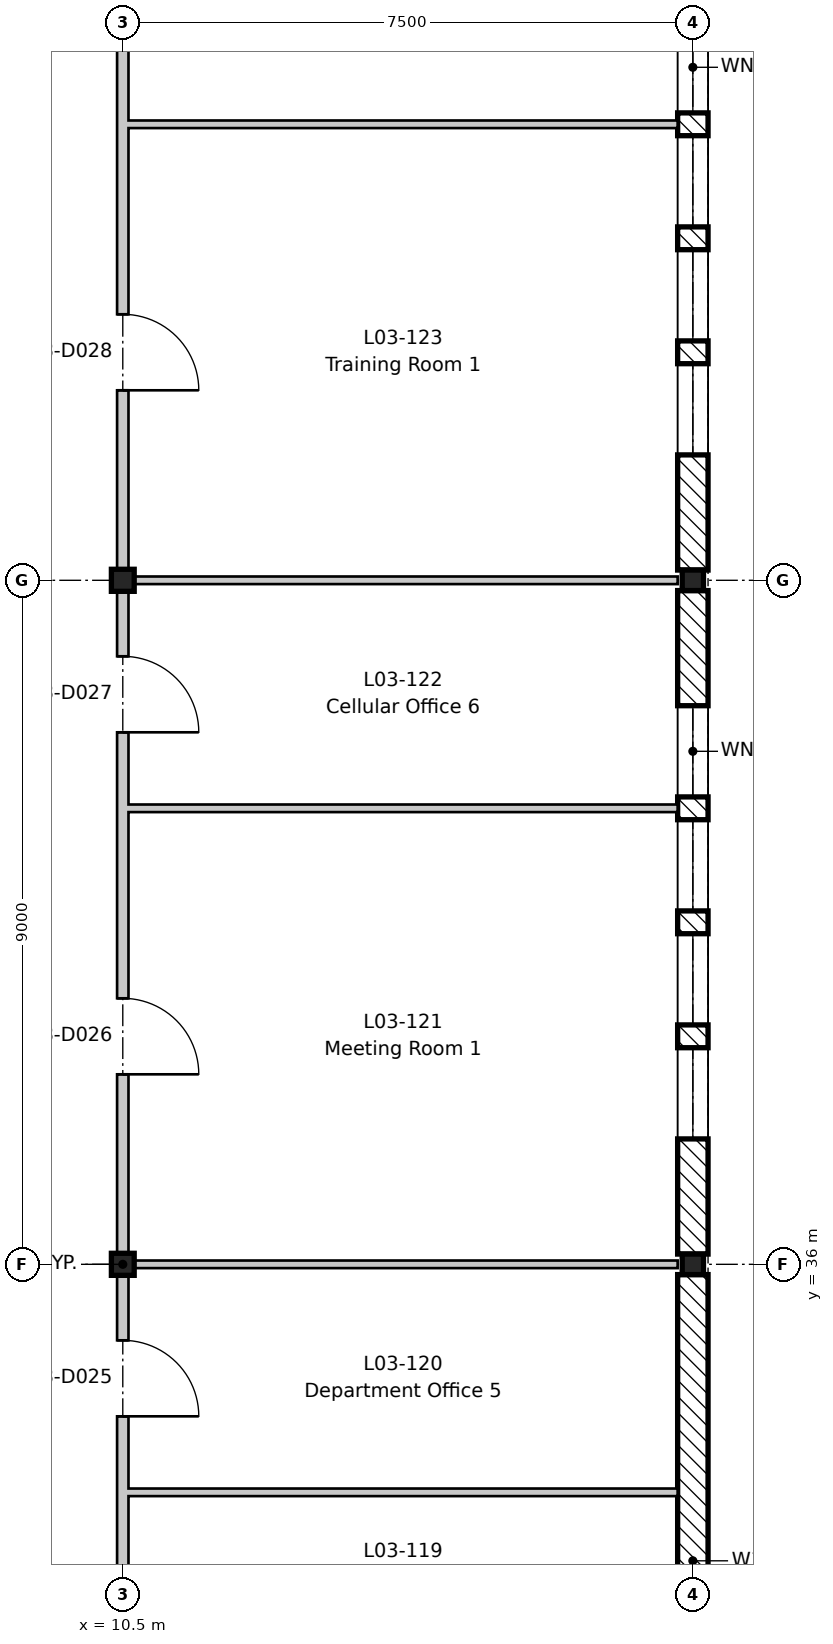
"""IFC4 building model, lengths in metres.
Left out: names, types, materials, properties, quantities, classifications, styles, units other than length and angle.
Written with IfcOpenShell. Run it as: python <this file> out.ifc"""

import sys

from ifc_helpers import new_model, si_unit, direction, frame, frame_2d, origin, origin_2d, place, context, subcontext, project, spatial, rectangle, i_section, extrude, element, fill, save


model = new_model("IFC4")
c1 = context("Model", 3, precision=1e-05, world=origin(), true_north=direction((0.0, 1.0)))
c2 = subcontext(c1, "Body", "Model", "MODEL_VIEW")
j1 = project(units=[si_unit("LENGTHUNIT", "METRE"), si_unit("PLANEANGLEUNIT", "RADIAN")], contexts=[c1])
p1 = place(None, origin())
s1 = spatial("IfcSite", under=j1, at=p1, CompositionType="ELEMENT")
p2 = place(p1, origin())
s2 = spatial("IfcBuilding", under=s1, at=p2, CompositionType="ELEMENT")
p3 = place(p2, frame((0.0, 0.0, 14.4)))
s3 = spatial("IfcBuildingStorey", under=s2, at=p3, CompositionType="ELEMENT", Elevation=14.4)
for number, where, z_axis, x_axis in (
    (1, (10.5, 36.0, -0.2), (0.0, 0.0, 1.0), (1.0, 0.0, 0.0)),
    (2, (10.5, 45.0, -0.2), (0.0, 0.0, 1.0), (1.0, 0.0, 0.0)),
):
    element("IfcColumn", number, at=place(p3, frame(where, z_axis=z_axis, x_axis=x_axis)), inside=s3, PredefinedType="COLUMN", context=c2, shape_type="SweptSolid", body=[
        extrude(i_section(OverallWidth=0.3, OverallDepth=0.29, WebThickness=0.009, FlangeThickness=0.014, FilletRadius=0.027, at=origin_2d()), origin(), (0.0, 0.0, 1.0), 4.2),
    ])
for number, where, z_axis, x_axis in (
    (3, (18.0, 36.0, -0.2), (0.0, 0.0, 1.0), (1.0, 0.0, 0.0)),
    (4, (18.0, 45.0, -0.2), (0.0, 0.0, 1.0), (1.0, 0.0, 0.0)),
):
    element("IfcColumn", number, at=place(p3, frame(where, z_axis=z_axis, x_axis=x_axis)), inside=s3, PredefinedType="COLUMN", context=c2, shape_type="SweptSolid", body=[
        extrude(i_section(OverallWidth=0.28, OverallDepth=0.27, WebThickness=0.008, FlangeThickness=0.013, FilletRadius=0.024, at=origin_2d()), origin(), (0.0, 0.0, 1.0), 4.2),
    ])
p4 = place(p3, frame((18.0, 35.865, 0.0), z_axis=(0.0, 0.0, 1.0), x_axis=(0.0, -1.0, 0.0)))
e5 = element("IfcWall", 5, at=p4, inside=s3, PredefinedType="STANDARD", context=c2, shape_type="SweptSolid", body=[
    extrude(rectangle(XDim=8.73, YDim=0.4, at=frame_2d((4.365, 0.0))), origin(), (0.0, 0.0, 1.0), 3.6),
])
p5 = place(p3, frame((18.0, 44.865, 0.0), z_axis=(0.0, 0.0, 1.0), x_axis=(0.0, -1.0, 0.0)))
e6 = element("IfcWall", 6, at=p5, inside=s3, PredefinedType="STANDARD", context=c2, shape_type="SweptSolid", body=[
    extrude(rectangle(XDim=8.73, YDim=0.4, at=frame_2d((4.365, 0.0))), origin(), (0.0, 0.0, 1.0), 3.6),
])
p6 = place(p5, frame((6.015, 0.0, 0.6)))
e7 = element("IfcOpeningElement", 7, at=p6, cuts=e6, PredefinedType="OPENING", context=c2, shape_type="SweptSolid", body=[
    extrude(rectangle(XDim=1.2, YDim=2.7, at=frame_2d((0.6, 1.35))), frame((0.0, 0.21, 0.0), z_axis=(0.0, -1.0, 0.0), x_axis=(1.0, 0.0, 0.0)), (0.0, 0.0, 1.0), 0.42),
])
p7 = place(p5, frame((4.515, 0.0, 0.6)))
e8 = element("IfcOpeningElement", 8, at=p7, cuts=e6, PredefinedType="OPENING", context=c2, shape_type="SweptSolid", body=[
    extrude(rectangle(XDim=1.2, YDim=2.7, at=frame_2d((0.6, 1.35))), frame((0.0, 0.21, 0.0), z_axis=(0.0, -1.0, 0.0), x_axis=(1.0, 0.0, 0.0)), (0.0, 0.0, 1.0), 0.42),
])
p8 = place(p5, frame((3.015, 0.0, 0.6)))
e9 = element("IfcOpeningElement", 9, at=p8, cuts=e6, PredefinedType="OPENING", context=c2, shape_type="SweptSolid", body=[
    extrude(rectangle(XDim=1.2, YDim=2.7, at=frame_2d((0.6, 1.35))), frame((0.0, 0.21, 0.0), z_axis=(0.0, -1.0, 0.0), x_axis=(1.0, 0.0, 0.0)), (0.0, 0.0, 1.0), 0.42),
])
p9 = place(p5, frame((1.515, 0.0, 0.6)))
e10 = element("IfcOpeningElement", 10, at=p9, cuts=e6, PredefinedType="OPENING", context=c2, shape_type="SweptSolid", body=[
    extrude(rectangle(XDim=1.2, YDim=2.7, at=frame_2d((0.6, 1.35))), frame((0.0, 0.21, 0.0), z_axis=(0.0, -1.0, 0.0), x_axis=(1.0, 0.0, 0.0)), (0.0, 0.0, 1.0), 0.42),
])
p10 = place(p3, frame((18.0, 53.865, 0.0), z_axis=(0.0, 0.0, 1.0), x_axis=(0.0, -1.0, 0.0)))
e11 = element("IfcWall", 11, at=p10, inside=s3, PredefinedType="STANDARD", context=c2, shape_type="SweptSolid", body=[
    extrude(rectangle(XDim=8.73, YDim=0.4, at=frame_2d((4.365, 0.0))), origin(), (0.0, 0.0, 1.0), 3.6),
])
p11 = place(p10, frame((6.015, 0.0, 0.6)))
e12 = element("IfcOpeningElement", 12, at=p11, cuts=e11, PredefinedType="OPENING", context=c2, shape_type="SweptSolid", body=[
    extrude(rectangle(XDim=1.2, YDim=2.7, at=frame_2d((0.6, 1.35))), frame((0.0, 0.21, 0.0), z_axis=(0.0, -1.0, 0.0), x_axis=(1.0, 0.0, 0.0)), (0.0, 0.0, 1.0), 0.42),
])
p12 = place(p10, frame((4.515, 0.0, 0.6)))
e13 = element("IfcOpeningElement", 13, at=p12, cuts=e11, PredefinedType="OPENING", context=c2, shape_type="SweptSolid", body=[
    extrude(rectangle(XDim=1.2, YDim=2.7, at=frame_2d((0.6, 1.35))), frame((0.0, 0.21, 0.0), z_axis=(0.0, -1.0, 0.0), x_axis=(1.0, 0.0, 0.0)), (0.0, 0.0, 1.0), 0.42),
])
p13 = place(p10, frame((3.015, 0.0, 0.6)))
e14 = element("IfcOpeningElement", 14, at=p13, cuts=e11, PredefinedType="OPENING", context=c2, shape_type="SweptSolid", body=[
    extrude(rectangle(XDim=1.2, YDim=2.7, at=frame_2d((0.6, 1.35))), frame((0.0, 0.21, 0.0), z_axis=(0.0, -1.0, 0.0), x_axis=(1.0, 0.0, 0.0)), (0.0, 0.0, 1.0), 0.42),
])
p14 = place(p10, frame((1.515, 0.0, 0.6)))
e15 = element("IfcOpeningElement", 15, at=p14, cuts=e11, PredefinedType="OPENING", context=c2, shape_type="SweptSolid", body=[
    extrude(rectangle(XDim=1.2, YDim=2.7, at=frame_2d((0.6, 1.35))), frame((0.0, 0.21, 0.0), z_axis=(0.0, -1.0, 0.0), x_axis=(1.0, 0.0, 0.0)), (0.0, 0.0, 1.0), 0.42),
])
p15 = place(p3, frame((10.575, 33.0, 0.0), z_axis=(0.0, 0.0, 1.0), x_axis=(1.0, 0.0, 0.0)))
e16 = element("IfcWall", 16, at=p15, inside=s3, PredefinedType="PARTITIONING", context=c2, shape_type="SweptSolid", body=[
    extrude(rectangle(XDim=7.225, YDim=0.1, at=frame_2d((3.613, 0.0))), origin(), (0.0, 0.0, 1.0), 4.0),
])
p16 = place(p3, frame((10.575, 36.0, 0.0), z_axis=(0.0, 0.0, 1.0), x_axis=(1.0, 0.0, 0.0)))
e17 = element("IfcWall", 17, at=p16, inside=s3, PredefinedType="PARTITIONING", context=c2, shape_type="SweptSolid", body=[
    extrude(rectangle(XDim=7.225, YDim=0.1, at=frame_2d((3.613, 0.0))), origin(), (0.0, 0.0, 1.0), 3.65),
])
p17 = place(p3, frame((10.575, 42.0, 0.0), z_axis=(0.0, 0.0, 1.0), x_axis=(1.0, 0.0, 0.0)))
e18 = element("IfcWall", 18, at=p17, inside=s3, PredefinedType="PARTITIONING", context=c2, shape_type="SweptSolid", body=[
    extrude(rectangle(XDim=7.225, YDim=0.1, at=frame_2d((3.613, 0.0))), origin(), (0.0, 0.0, 1.0), 4.0),
])
p18 = place(p3, frame((10.575, 45.0, 0.0), z_axis=(0.0, 0.0, 1.0), x_axis=(1.0, 0.0, 0.0)))
e19 = element("IfcWall", 19, at=p18, inside=s3, PredefinedType="PARTITIONING", context=c2, shape_type="SweptSolid", body=[
    extrude(rectangle(XDim=7.225, YDim=0.1, at=frame_2d((3.613, 0.0))), origin(), (0.0, 0.0, 1.0), 3.65),
])
p19 = place(p3, frame((10.575, 51.0, 0.0), z_axis=(0.0, 0.0, 1.0), x_axis=(1.0, 0.0, 0.0)))
e20 = element("IfcWall", 20, at=p19, inside=s3, PredefinedType="PARTITIONING", context=c2, shape_type="SweptSolid", body=[
    extrude(rectangle(XDim=7.225, YDim=0.1, at=frame_2d((3.613, 0.0))), origin(), (0.0, 0.0, 1.0), 4.0),
])
p20 = place(p3, frame((10.5, -8.8, 0.0), z_axis=(0.0, 0.0, 1.0), x_axis=(0.0, 1.0, 0.0)))
e21 = element("IfcWall", 21, at=p20, inside=s3, PredefinedType="PARTITIONING", context=c2, shape_type="SweptSolid", body=[
    extrude(rectangle(XDim=79.3, YDim=0.15, at=frame_2d((39.65, 0.0))), origin(), (0.0, 0.0, 1.0), 3.48),
])
p21 = place(p20, frame((3.6, 0.0, 0.0)))
e22 = element("IfcOpeningElement", 22, at=p21, cuts=e21, PredefinedType="OPENING", context=c2, shape_type="SweptSolid", body=[
    extrude(rectangle(XDim=1.4, YDim=2.1, at=frame_2d((0.7, 1.05))), frame((0.0, 0.085, 0.0), z_axis=(0.0, -1.0, 0.0), x_axis=(1.0, 0.0, 0.0)), (0.0, 0.0, 1.0), 0.17),
])
p22 = place(p20, frame((9.8, 0.0, 0.0)))
e23 = element("IfcOpeningElement", 23, at=p22, cuts=e21, PredefinedType="OPENING", context=c2, shape_type="SweptSolid", body=[
    extrude(rectangle(XDim=1.0, YDim=2.1, at=frame_2d((0.5, 1.05))), frame((0.0, 0.085, 0.0), z_axis=(0.0, -1.0, 0.0), x_axis=(1.0, 0.0, 0.0)), (0.0, 0.0, 1.0), 0.17),
])
p23 = place(p20, frame((12.8, 0.0, 0.0)))
e24 = element("IfcOpeningElement", 24, at=p23, cuts=e21, PredefinedType="OPENING", context=c2, shape_type="SweptSolid", body=[
    extrude(rectangle(XDim=1.0, YDim=2.1, at=frame_2d((0.5, 1.05))), frame((0.0, 0.085, 0.0), z_axis=(0.0, -1.0, 0.0), x_axis=(1.0, 0.0, 0.0)), (0.0, 0.0, 1.0), 0.17),
])
p24 = place(p20, frame((15.8, 0.0, 0.0)))
e25 = element("IfcOpeningElement", 25, at=p24, cuts=e21, PredefinedType="OPENING", context=c2, shape_type="SweptSolid", body=[
    extrude(rectangle(XDim=1.0, YDim=2.1, at=frame_2d((0.5, 1.05))), frame((0.0, 0.085, 0.0), z_axis=(0.0, -1.0, 0.0), x_axis=(1.0, 0.0, 0.0)), (0.0, 0.0, 1.0), 0.17),
])
p25 = place(p20, frame((18.8, 0.0, 0.0)))
e26 = element("IfcOpeningElement", 26, at=p25, cuts=e21, PredefinedType="OPENING", context=c2, shape_type="SweptSolid", body=[
    extrude(rectangle(XDim=1.0, YDim=2.1, at=frame_2d((0.5, 1.05))), frame((0.0, 0.085, 0.0), z_axis=(0.0, -1.0, 0.0), x_axis=(1.0, 0.0, 0.0)), (0.0, 0.0, 1.0), 0.17),
])
p26 = place(p20, frame((21.8, 0.0, 0.0)))
e27 = element("IfcOpeningElement", 27, at=p26, cuts=e21, PredefinedType="OPENING", context=c2, shape_type="SweptSolid", body=[
    extrude(rectangle(XDim=1.0, YDim=2.1, at=frame_2d((0.5, 1.05))), frame((0.0, 0.085, 0.0), z_axis=(0.0, -1.0, 0.0), x_axis=(1.0, 0.0, 0.0)), (0.0, 0.0, 1.0), 0.17),
])
p27 = place(p20, frame((27.6, 0.0, 0.0)))
e28 = element("IfcOpeningElement", 28, at=p27, cuts=e21, PredefinedType="OPENING", context=c2, shape_type="SweptSolid", body=[
    extrude(rectangle(XDim=1.4, YDim=2.1, at=frame_2d((0.7, 1.05))), frame((0.0, 0.085, 0.0), z_axis=(0.0, -1.0, 0.0), x_axis=(1.0, 0.0, 0.0)), (0.0, 0.0, 1.0), 0.17),
])
p28 = place(p20, frame((36.55, 0.0, 0.0)))
e29 = element("IfcOpeningElement", 29, at=p28, cuts=e21, PredefinedType="OPENING", context=c2, shape_type="SweptSolid", body=[
    extrude(rectangle(XDim=1.0, YDim=2.1, at=frame_2d((0.5, 1.05))), frame((0.0, 0.085, 0.0), z_axis=(0.0, -1.0, 0.0), x_axis=(1.0, 0.0, 0.0)), (0.0, 0.0, 1.0), 0.17),
])
p29 = place(p20, frame((39.8, 0.0, 0.0)))
e30 = element("IfcOpeningElement", 30, at=p29, cuts=e21, PredefinedType="OPENING", context=c2, shape_type="SweptSolid", body=[
    extrude(rectangle(XDim=1.0, YDim=2.1, at=frame_2d((0.5, 1.05))), frame((0.0, 0.085, 0.0), z_axis=(0.0, -1.0, 0.0), x_axis=(1.0, 0.0, 0.0)), (0.0, 0.0, 1.0), 0.17),
])
p30 = place(p20, frame((42.8, 0.0, 0.0)))
e31 = element("IfcOpeningElement", 31, at=p30, cuts=e21, PredefinedType="OPENING", context=c2, shape_type="SweptSolid", body=[
    extrude(rectangle(XDim=1.0, YDim=2.1, at=frame_2d((0.5, 1.05))), frame((0.0, 0.085, 0.0), z_axis=(0.0, -1.0, 0.0), x_axis=(1.0, 0.0, 0.0)), (0.0, 0.0, 1.0), 0.17),
])
p31 = place(p20, frame((47.3, 0.0, 0.0)))
e32 = element("IfcOpeningElement", 32, at=p31, cuts=e21, PredefinedType="OPENING", context=c2, shape_type="SweptSolid", body=[
    extrude(rectangle(XDim=1.0, YDim=2.1, at=frame_2d((0.5, 1.05))), frame((0.0, 0.085, 0.0), z_axis=(0.0, -1.0, 0.0), x_axis=(1.0, 0.0, 0.0)), (0.0, 0.0, 1.0), 0.17),
])
p32 = place(p20, frame((51.8, 0.0, 0.0)))
e33 = element("IfcOpeningElement", 33, at=p32, cuts=e21, PredefinedType="OPENING", context=c2, shape_type="SweptSolid", body=[
    extrude(rectangle(XDim=1.0, YDim=2.1, at=frame_2d((0.5, 1.05))), frame((0.0, 0.085, 0.0), z_axis=(0.0, -1.0, 0.0), x_axis=(1.0, 0.0, 0.0)), (0.0, 0.0, 1.0), 0.17),
])
p33 = place(p20, frame((56.3, 0.0, 0.0)))
e34 = element("IfcOpeningElement", 34, at=p33, cuts=e21, PredefinedType="OPENING", context=c2, shape_type="SweptSolid", body=[
    extrude(rectangle(XDim=1.0, YDim=2.1, at=frame_2d((0.5, 1.05))), frame((0.0, 0.085, 0.0), z_axis=(0.0, -1.0, 0.0), x_axis=(1.0, 0.0, 0.0)), (0.0, 0.0, 1.0), 0.17),
])
p34 = place(p20, frame((60.8, 0.0, 0.0)))
e35 = element("IfcOpeningElement", 35, at=p34, cuts=e21, PredefinedType="OPENING", context=c2, shape_type="SweptSolid", body=[
    extrude(rectangle(XDim=1.0, YDim=2.1, at=frame_2d((0.5, 1.05))), frame((0.0, 0.085, 0.0), z_axis=(0.0, -1.0, 0.0), x_axis=(1.0, 0.0, 0.0)), (0.0, 0.0, 1.0), 0.17),
])
p35 = place(p20, frame((63.8, 0.0, 0.0)))
e36 = element("IfcOpeningElement", 36, at=p35, cuts=e21, PredefinedType="OPENING", context=c2, shape_type="SweptSolid", body=[
    extrude(rectangle(XDim=1.0, YDim=2.1, at=frame_2d((0.5, 1.05))), frame((0.0, 0.085, 0.0), z_axis=(0.0, -1.0, 0.0), x_axis=(1.0, 0.0, 0.0)), (0.0, 0.0, 1.0), 0.17),
])
p36 = place(p20, frame((66.8, 0.0, 0.0)))
e37 = element("IfcOpeningElement", 37, at=p36, cuts=e21, PredefinedType="OPENING", context=c2, shape_type="SweptSolid", body=[
    extrude(rectangle(XDim=1.0, YDim=2.1, at=frame_2d((0.5, 1.05))), frame((0.0, 0.085, 0.0), z_axis=(0.0, -1.0, 0.0), x_axis=(1.0, 0.0, 0.0)), (0.0, 0.0, 1.0), 0.17),
])
p37 = place(p20, frame((69.8, 0.0, 0.0)))
e38 = element("IfcOpeningElement", 38, at=p37, cuts=e21, PredefinedType="OPENING", context=c2, shape_type="SweptSolid", body=[
    extrude(rectangle(XDim=1.0, YDim=2.1, at=frame_2d((0.5, 1.05))), frame((0.0, 0.085, 0.0), z_axis=(0.0, -1.0, 0.0), x_axis=(1.0, 0.0, 0.0)), (0.0, 0.0, 1.0), 0.17),
])
p38 = place(p20, frame((72.8, 0.0, 0.0)))
e39 = element("IfcOpeningElement", 39, at=p38, cuts=e21, PredefinedType="OPENING", context=c2, shape_type="SweptSolid", body=[
    extrude(rectangle(XDim=1.0, YDim=2.1, at=frame_2d((0.5, 1.05))), frame((0.0, 0.085, 0.0), z_axis=(0.0, -1.0, 0.0), x_axis=(1.0, 0.0, 0.0)), (0.0, 0.0, 1.0), 0.17),
])
p39 = place(p6, origin())
e40 = element("IfcWindow", 40, at=p39, inside=s3, PartitioningType="SINGLE_PANEL", PredefinedType="WINDOW", context=c2, shape_type="SweptSolid", body=[
    extrude(rectangle(XDim=1.2, YDim=2.7, at=frame_2d((0.6, 1.35))), frame((0.0, 0.03, 0.0), z_axis=(0.0, -1.0, 0.0), x_axis=(1.0, 0.0, 0.0)), (0.0, 0.0, 1.0), 0.06),
])
fill(e7, e40)
p40 = place(p7, origin())
e41 = element("IfcWindow", 41, at=p40, inside=s3, PartitioningType="SINGLE_PANEL", PredefinedType="WINDOW", context=c2, shape_type="SweptSolid", body=[
    extrude(rectangle(XDim=1.2, YDim=2.7, at=frame_2d((0.6, 1.35))), frame((0.0, 0.03, 0.0), z_axis=(0.0, -1.0, 0.0), x_axis=(1.0, 0.0, 0.0)), (0.0, 0.0, 1.0), 0.06),
])
fill(e8, e41)
p41 = place(p8, origin())
e42 = element("IfcWindow", 42, at=p41, inside=s3, PartitioningType="SINGLE_PANEL", PredefinedType="WINDOW", context=c2, shape_type="SweptSolid", body=[
    extrude(rectangle(XDim=1.2, YDim=2.7, at=frame_2d((0.6, 1.35))), frame((0.0, 0.03, 0.0), z_axis=(0.0, -1.0, 0.0), x_axis=(1.0, 0.0, 0.0)), (0.0, 0.0, 1.0), 0.06),
])
fill(e9, e42)
p42 = place(p9, origin())
e43 = element("IfcWindow", 43, at=p42, inside=s3, PartitioningType="SINGLE_PANEL", PredefinedType="WINDOW", context=c2, shape_type="SweptSolid", body=[
    extrude(rectangle(XDim=1.2, YDim=2.7, at=frame_2d((0.6, 1.35))), frame((0.0, 0.03, 0.0), z_axis=(0.0, -1.0, 0.0), x_axis=(1.0, 0.0, 0.0)), (0.0, 0.0, 1.0), 0.06),
])
fill(e10, e43)
p43 = place(p11, origin())
e44 = element("IfcWindow", 44, at=p43, inside=s3, PartitioningType="SINGLE_PANEL", PredefinedType="WINDOW", context=c2, shape_type="SweptSolid", body=[
    extrude(rectangle(XDim=1.2, YDim=2.7, at=frame_2d((0.6, 1.35))), frame((0.0, 0.03, 0.0), z_axis=(0.0, -1.0, 0.0), x_axis=(1.0, 0.0, 0.0)), (0.0, 0.0, 1.0), 0.06),
])
fill(e12, e44)
p44 = place(p12, origin())
e45 = element("IfcWindow", 45, at=p44, inside=s3, PartitioningType="SINGLE_PANEL", PredefinedType="WINDOW", context=c2, shape_type="SweptSolid", body=[
    extrude(rectangle(XDim=1.2, YDim=2.7, at=frame_2d((0.6, 1.35))), frame((0.0, 0.03, 0.0), z_axis=(0.0, -1.0, 0.0), x_axis=(1.0, 0.0, 0.0)), (0.0, 0.0, 1.0), 0.06),
])
fill(e13, e45)
p45 = place(p13, origin())
e46 = element("IfcWindow", 46, at=p45, inside=s3, PartitioningType="SINGLE_PANEL", PredefinedType="WINDOW", context=c2, shape_type="SweptSolid", body=[
    extrude(rectangle(XDim=1.2, YDim=2.7, at=frame_2d((0.6, 1.35))), frame((0.0, 0.03, 0.0), z_axis=(0.0, -1.0, 0.0), x_axis=(1.0, 0.0, 0.0)), (0.0, 0.0, 1.0), 0.06),
])
fill(e14, e46)
p46 = place(p14, origin())
e47 = element("IfcWindow", 47, at=p46, inside=s3, PartitioningType="SINGLE_PANEL", PredefinedType="WINDOW", context=c2, shape_type="SweptSolid", body=[
    extrude(rectangle(XDim=1.2, YDim=2.7, at=frame_2d((0.6, 1.35))), frame((0.0, 0.03, 0.0), z_axis=(0.0, -1.0, 0.0), x_axis=(1.0, 0.0, 0.0)), (0.0, 0.0, 1.0), 0.06),
])
fill(e15, e47)
p47 = place(p30, frame((1.0, 0.0, 0.0), z_axis=(0.0, 0.0, 1.0), x_axis=(-1.0, 0.0, 0.0)))
e48 = element("IfcDoor", 48, at=p47, inside=s3, OperationType="SINGLE_SWING_RIGHT", PredefinedType="DOOR", context=c2, shape_type="SweptSolid", body=[
    extrude(rectangle(XDim=1.0, YDim=2.1, at=frame_2d((0.5, 1.05))), frame((0.0, 0.025, 0.0), z_axis=(0.0, -1.0, 0.0), x_axis=(1.0, 0.0, 0.0)), (0.0, 0.0, 1.0), 0.05),
])
fill(e31, e48)
p48 = place(p31, frame((1.0, 0.0, 0.0), z_axis=(0.0, 0.0, 1.0), x_axis=(-1.0, 0.0, 0.0)))
e49 = element("IfcDoor", 49, at=p48, inside=s3, OperationType="SINGLE_SWING_RIGHT", PredefinedType="DOOR", context=c2, shape_type="SweptSolid", body=[
    extrude(rectangle(XDim=1.0, YDim=2.1, at=frame_2d((0.5, 1.05))), frame((0.0, 0.025, 0.0), z_axis=(0.0, -1.0, 0.0), x_axis=(1.0, 0.0, 0.0)), (0.0, 0.0, 1.0), 0.05),
])
fill(e32, e49)
p49 = place(p32, frame((1.0, 0.0, 0.0), z_axis=(0.0, 0.0, 1.0), x_axis=(-1.0, 0.0, 0.0)))
e50 = element("IfcDoor", 50, at=p49, inside=s3, OperationType="SINGLE_SWING_RIGHT", PredefinedType="DOOR", context=c2, shape_type="SweptSolid", body=[
    extrude(rectangle(XDim=1.0, YDim=2.1, at=frame_2d((0.5, 1.05))), frame((0.0, 0.025, 0.0), z_axis=(0.0, -1.0, 0.0), x_axis=(1.0, 0.0, 0.0)), (0.0, 0.0, 1.0), 0.05),
])
fill(e33, e50)
p50 = place(p33, frame((1.0, 0.0, 0.0), z_axis=(0.0, 0.0, 1.0), x_axis=(-1.0, 0.0, 0.0)))
e51 = element("IfcDoor", 51, at=p50, inside=s3, OperationType="SINGLE_SWING_RIGHT", PredefinedType="DOOR", context=c2, shape_type="SweptSolid", body=[
    extrude(rectangle(XDim=1.0, YDim=2.1, at=frame_2d((0.5, 1.05))), frame((0.0, 0.025, 0.0), z_axis=(0.0, -1.0, 0.0), x_axis=(1.0, 0.0, 0.0)), (0.0, 0.0, 1.0), 0.05),
])
fill(e34, e51)
save(model, sys.argv[1])
